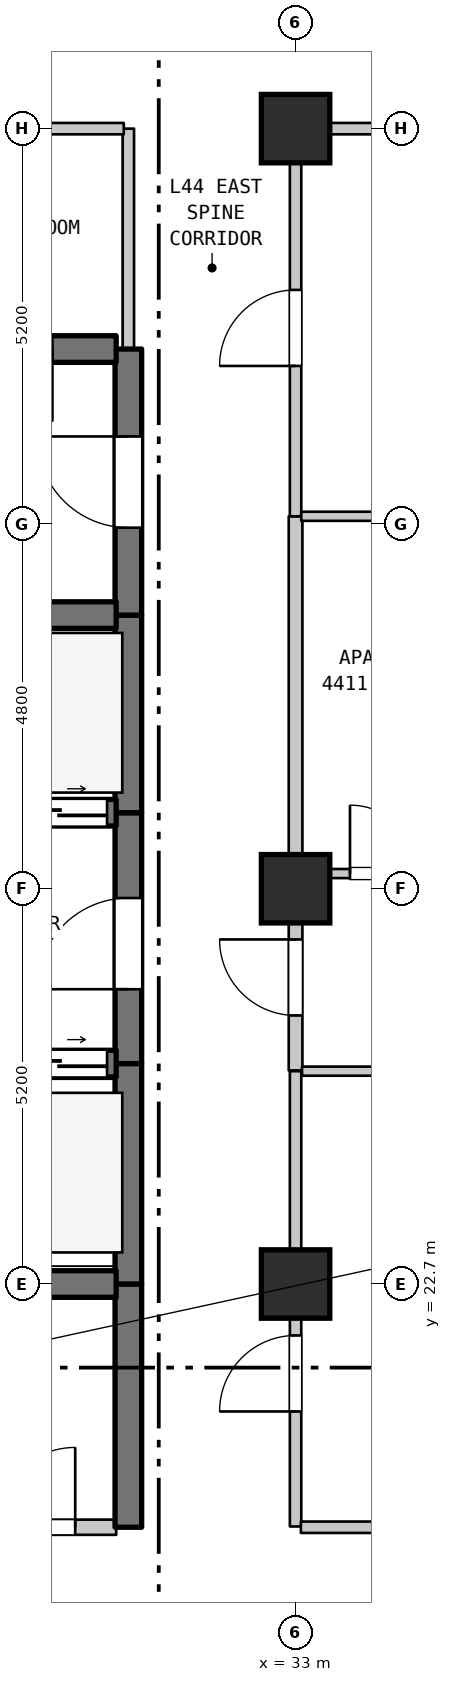
"""IFC4 building model, lengths in metres.
Left out: names, types, materials, properties, quantities, classifications, styles, units other than length and angle.
Written with IfcOpenShell. Run it as: python <this file> out.ifc"""

import sys

from ifc_helpers import new_model, si_unit, direction, frame, frame_2d, origin, origin_2d, place, context, subcontext, project, spatial, rectangle, extrude, element, fill, save


model = new_model("IFC4")
c1 = context("Model", 3, precision=1e-05, world=origin(), true_north=direction((0.0, 1.0)))
c2 = subcontext(c1, "Body", "Model", "MODEL_VIEW")
j1 = project(units=[si_unit("LENGTHUNIT", "METRE"), si_unit("PLANEANGLEUNIT", "RADIAN")], contexts=[c1])
p1 = place(None, origin())
s1 = spatial("IfcSite", under=j1, at=p1, CompositionType="ELEMENT")
p2 = place(p1, origin())
s2 = spatial("IfcBuilding", under=s1, at=p2, CompositionType="ELEMENT")
p3 = place(p2, frame((0.0, 0.0, 180.2)))
s3 = spatial("IfcBuildingStorey", under=s2, at=p3, CompositionType="ELEMENT", Elevation=180.2)
for number, where, z_axis, x_axis in (
    (1, (33.0, 22.7, 0.0), (0.0, 0.0, 1.0), (1.0, 0.0, 0.0)),
    (2, (33.0, 27.9, 0.0), (0.0, 0.0, 1.0), (1.0, 0.0, 0.0)),
    (3, (33.0, 37.9, 0.0), (0.0, 0.0, 1.0), (1.0, 0.0, 0.0)),
):
    element("IfcColumn", number, at=place(p3, frame(where, z_axis=z_axis, x_axis=x_axis)), inside=s3, PredefinedType="COLUMN", context=c2, shape_type="SweptSolid", body=[
        extrude(rectangle(XDim=0.9, YDim=0.9, at=origin_2d()), origin(), (0.0, 0.0, 1.0), 3.7),
    ])
p4 = place(p3, frame((30.8, 19.5, 0.0), z_axis=(0.0, 0.0, 1.0), x_axis=(0.0, 1.0, 0.0)))
e4 = element("IfcWall", 4, at=p4, inside=s3, PredefinedType="SHEAR", context=c2, shape_type="SweptSolid", body=[
    extrude(rectangle(XDim=3.2, YDim=0.35, at=frame_2d((1.6, 0.0))), origin(), (0.0, 0.0, 1.0), 3.38),
])
p5 = place(p3, frame((30.8, 22.7, 0.0), z_axis=(0.0, 0.0, 1.0), x_axis=(0.0, 1.0, 0.0)))
e5 = element("IfcWall", 5, at=p5, inside=s3, PredefinedType="SHEAR", context=c2, shape_type="SweptSolid", body=[
    extrude(rectangle(XDim=2.9, YDim=0.35, at=frame_2d((1.45, 0.0))), origin(), (0.0, 0.0, 1.0), 3.38),
])
p6 = place(p3, frame((30.8, 25.6, 0.0), z_axis=(0.0, 0.0, 1.0), x_axis=(0.0, 1.0, 0.0)))
e6 = element("IfcWall", 6, at=p6, inside=s3, PredefinedType="SHEAR", context=c2, shape_type="SweptSolid", body=[
    extrude(rectangle(XDim=3.3, YDim=0.35, at=frame_2d((1.65, 0.0))), origin(), (0.0, 0.0, 1.0), 3.38),
])
p7 = place(p6, frame((0.978, 0.0, 0.0)))
e7 = element("IfcOpeningElement", 7, at=p7, cuts=e6, PredefinedType="OPENING", context=c2, shape_type="SweptSolid", body=[
    extrude(rectangle(XDim=1.2, YDim=2.2, at=frame_2d((0.6, 1.1))), frame((0.0, 0.185, 0.0), z_axis=(0.0, -1.0, 0.0), x_axis=(1.0, 0.0, 0.0)), (0.0, 0.0, 1.0), 0.37),
])
p8 = place(p3, frame((30.8, 28.9, 0.0), z_axis=(0.0, 0.0, 1.0), x_axis=(0.0, 1.0, 0.0)))
e8 = element("IfcWall", 8, at=p8, inside=s3, PredefinedType="SHEAR", context=c2, shape_type="SweptSolid", body=[
    extrude(rectangle(XDim=2.6, YDim=0.35, at=frame_2d((1.3, 0.0))), origin(), (0.0, 0.0, 1.0), 3.38),
])
p9 = place(p3, frame((30.8, 31.5, 0.0), z_axis=(0.0, 0.0, 1.0), x_axis=(0.0, 1.0, 0.0)))
e9 = element("IfcWall", 9, at=p9, inside=s3, PredefinedType="SHEAR", context=c2, shape_type="SweptSolid", body=[
    extrude(rectangle(XDim=3.5, YDim=0.35, at=frame_2d((1.75, 0.0))), origin(), (0.0, 0.0, 1.0), 3.38),
])
p10 = place(p9, frame((1.15, 0.0, 0.0)))
e10 = element("IfcOpeningElement", 10, at=p10, cuts=e9, PredefinedType="OPENING", context=c2, shape_type="SweptSolid", body=[
    extrude(rectangle(XDim=1.2, YDim=2.2, at=frame_2d((0.6, 1.1))), frame((0.0, 0.185, 0.0), z_axis=(0.0, -1.0, 0.0), x_axis=(1.0, 0.0, 0.0)), (0.0, 0.0, 1.0), 0.37),
])
p11 = place(p3, frame((30.8, 35.0, 0.0), z_axis=(0.0, 0.0, 1.0), x_axis=(0.0, 1.0, 0.0)))
e11 = element("IfcWall", 11, at=p11, inside=s3, PredefinedType="STANDARD", context=c2, shape_type="SweptSolid", body=[
    extrude(rectangle(XDim=2.9, YDim=0.15, at=frame_2d((1.45, 0.0))), origin(), (0.0, 0.0, 1.0), 3.38),
])
p12 = place(p3, frame((33.0, 19.51, 0.0), z_axis=(0.0, 0.0, 1.0), x_axis=(0.0, 1.0, 0.0)))
e12 = element("IfcWall", 12, at=p12, inside=s3, PredefinedType="STANDARD", context=c2, shape_type="SweptSolid", body=[
    extrude(rectangle(XDim=5.99, YDim=0.15, at=frame_2d((2.995, 0.0))), origin(), (0.0, 0.0, 1.0), 2.98),
])
p13 = place(p12, frame((1.513, 0.0, 0.0)))
e13 = element("IfcOpeningElement", 13, at=p13, cuts=e12, PredefinedType="OPENING", context=c2, shape_type="SweptSolid", body=[
    extrude(rectangle(XDim=1.0, YDim=2.15, at=frame_2d((0.5, 1.075))), frame((0.0, 0.085, 0.0), z_axis=(0.0, -1.0, 0.0), x_axis=(1.0, 0.0, 0.0)), (0.0, 0.0, 1.0), 0.17),
])
p14 = place(p3, frame((33.0, 25.51, 0.0), z_axis=(0.0, 0.0, 1.0), x_axis=(0.0, 1.0, 0.0)))
e14 = element("IfcWall", 14, at=p14, inside=s3, PredefinedType="STANDARD", context=c2, shape_type="SweptSolid", body=[
    extrude(rectangle(XDim=2.6, YDim=0.18, at=frame_2d((1.3, 0.0))), origin(), (0.0, 0.0, 1.0), 2.98),
])
p15 = place(p14, frame((0.723, 0.0, 0.0)))
e15 = element("IfcOpeningElement", 15, at=p15, cuts=e14, PredefinedType="OPENING", context=c2, shape_type="SweptSolid", body=[
    extrude(rectangle(XDim=1.0, YDim=2.15, at=frame_2d((0.5, 1.075))), frame((0.0, 0.1, 0.0), z_axis=(0.0, -1.0, 0.0), x_axis=(1.0, 0.0, 0.0)), (0.0, 0.0, 1.0), 0.2),
])
p16 = place(p3, frame((33.0, 28.11, 0.0), z_axis=(0.0, 0.0, 1.0), x_axis=(0.0, 1.0, 0.0)))
e16 = element("IfcWall", 16, at=p16, inside=s3, PredefinedType="STANDARD", context=c2, shape_type="SweptSolid", body=[
    extrude(rectangle(XDim=4.69, YDim=0.18, at=frame_2d((2.345, 0.0))), origin(), (0.0, 0.0, 1.0), 2.88),
])
p17 = place(p3, frame((33.0, 32.8, 0.0), z_axis=(0.0, 0.0, 1.0), x_axis=(0.0, 1.0, 0.0)))
e17 = element("IfcWall", 17, at=p17, inside=s3, PredefinedType="STANDARD", context=c2, shape_type="SweptSolid", body=[
    extrude(rectangle(XDim=5.1, YDim=0.15, at=frame_2d((2.55, 0.0))), origin(), (0.0, 0.0, 1.0), 2.88),
])
p18 = place(p17, frame((1.978, 0.0, 0.0)))
e18 = element("IfcOpeningElement", 18, at=p18, cuts=e17, PredefinedType="OPENING", context=c2, shape_type="SweptSolid", body=[
    extrude(rectangle(XDim=1.0, YDim=2.15, at=frame_2d((0.5, 1.075))), frame((0.0, 0.085, 0.0), z_axis=(0.0, -1.0, 0.0), x_axis=(1.0, 0.0, 0.0)), (0.0, 0.0, 1.0), 0.17),
])
p19 = place(p3, frame((28.585, 19.5, 0.0), z_axis=(0.0, 0.0, 1.0), x_axis=(1.0, 0.0, 0.0)))
e19 = element("IfcWall", 19, at=p19, inside=s3, PredefinedType="STANDARD", context=c2, shape_type="SweptSolid", body=[
    extrude(rectangle(XDim=2.055, YDim=0.2, at=frame_2d((1.027, 0.0))), origin(), (0.0, 0.0, 1.0), 3.38),
])
p20 = place(p19, frame((0.466, 0.0, 0.0)))
e20 = element("IfcOpeningElement", 20, at=p20, cuts=e19, PredefinedType="OPENING", context=c2, shape_type="SweptSolid", body=[
    extrude(rectangle(XDim=1.05, YDim=2.15, at=frame_2d((0.525, 1.075))), frame((0.0, 0.11, 0.0), z_axis=(0.0, -1.0, 0.0), x_axis=(1.0, 0.0, 0.0)), (0.0, 0.0, 1.0), 0.22),
])
p21 = place(p3, frame((33.07, 19.5, 0.0), z_axis=(0.0, 0.0, 1.0), x_axis=(1.0, 0.0, 0.0)))
e21 = element("IfcWall", 21, at=p21, inside=s3, PredefinedType="STANDARD", context=c2, shape_type="SweptSolid", body=[
    extrude(rectangle(XDim=21.51, YDim=0.15, at=frame_2d((10.755, 0.0))), origin(), (0.0, 0.0, 1.0), 3.38),
])
p22 = place(p21, frame((10.185, 0.0, 0.0)))
e22 = element("IfcOpeningElement", 22, at=p22, cuts=e21, PredefinedType="OPENING", context=c2, shape_type="SweptSolid", body=[
    extrude(rectangle(XDim=1.0, YDim=2.15, at=frame_2d((0.5, 1.075))), frame((0.0, 0.085, 0.0), z_axis=(0.0, -1.0, 0.0), x_axis=(1.0, 0.0, 0.0)), (0.0, 0.0, 1.0), 0.17),
])
p23 = place(p3, frame((28.585, 22.7, 0.0), z_axis=(0.0, 0.0, 1.0), x_axis=(1.0, 0.0, 0.0)))
e23 = element("IfcWall", 23, at=p23, inside=s3, PredefinedType="SHEAR", context=c2, shape_type="SweptSolid", body=[
    extrude(rectangle(XDim=2.055, YDim=0.35, at=frame_2d((1.027, 0.0))), origin(), (0.0, 0.0, 1.0), 3.38),
])
p24 = place(p3, frame((33.085, 25.5, 0.0), z_axis=(0.0, 0.0, 1.0), x_axis=(1.0, 0.0, 0.0)))
e24 = element("IfcWall", 24, at=p24, inside=s3, PredefinedType="PARTITIONING", context=c2, shape_type="SweptSolid", body=[
    extrude(rectangle(XDim=23.905, YDim=0.12, at=frame_2d((11.953, 0.0))), origin(), (0.0, 0.0, 1.0), 3.38),
])
p25 = place(p3, frame((27.46, 25.6, 0.0), z_axis=(0.0, 0.0, 1.0), x_axis=(1.0, 0.0, 0.0)))
e25 = element("IfcWall", 25, at=p25, inside=s3, PredefinedType="SHEAR", context=c2, shape_type="SweptSolid", body=[
    extrude(rectangle(XDim=3.18, YDim=0.35, at=frame_2d((1.59, 0.0))), origin(), (0.0, 0.0, 1.0), 3.38),
])
p26 = place(p25, frame((0.12, 0.0, 0.0)))
e26 = element("IfcOpeningElement", 26, at=p26, cuts=e25, PredefinedType="OPENING", context=c2, shape_type="SweptSolid", body=[
    extrude(rectangle(XDim=1.25, YDim=2.2, at=frame_2d((0.625, 1.1))), frame((0.0, 0.185, 0.0), z_axis=(0.0, -1.0, 0.0), x_axis=(1.0, 0.0, 0.0)), (0.0, 0.0, 1.0), 0.37),
])
p27 = place(p25, frame((1.81, 0.0, 0.0)))
e27 = element("IfcOpeningElement", 27, at=p27, cuts=e25, PredefinedType="OPENING", context=c2, shape_type="SweptSolid", body=[
    extrude(rectangle(XDim=1.25, YDim=2.2, at=frame_2d((0.625, 1.1))), frame((0.0, 0.185, 0.0), z_axis=(0.0, -1.0, 0.0), x_axis=(1.0, 0.0, 0.0)), (0.0, 0.0, 1.0), 0.37),
])
p28 = place(p3, frame((33.075, 28.1, 0.0), z_axis=(0.0, 0.0, 1.0), x_axis=(1.0, 0.0, 0.0)))
e28 = element("IfcWall", 28, at=p28, inside=s3, PredefinedType="PARTITIONING", context=c2, shape_type="SweptSolid", body=[
    extrude(rectangle(XDim=2.364, YDim=0.12, at=frame_2d((1.182, 0.0))), origin(), (0.0, 0.0, 1.0), 3.38),
])
p29 = place(p28, frame((0.641, 0.0, 0.0)))
e29 = element("IfcOpeningElement", 29, at=p29, cuts=e28, PredefinedType="OPENING", context=c2, shape_type="SweptSolid", body=[
    extrude(rectangle(XDim=0.9, YDim=2.15, at=frame_2d((0.45, 1.075))), frame((0.0, 0.07, 0.0), z_axis=(0.0, -1.0, 0.0), x_axis=(1.0, 0.0, 0.0)), (0.0, 0.0, 1.0), 0.14),
])
p30 = place(p3, frame((27.46, 28.9, 0.0), z_axis=(0.0, 0.0, 1.0), x_axis=(1.0, 0.0, 0.0)))
e30 = element("IfcWall", 30, at=p30, inside=s3, PredefinedType="SHEAR", context=c2, shape_type="SweptSolid", body=[
    extrude(rectangle(XDim=3.18, YDim=0.35, at=frame_2d((1.59, 0.0))), origin(), (0.0, 0.0, 1.0), 3.38),
])
p31 = place(p30, frame((0.12, 0.0, 0.0)))
e31 = element("IfcOpeningElement", 31, at=p31, cuts=e30, PredefinedType="OPENING", context=c2, shape_type="SweptSolid", body=[
    extrude(rectangle(XDim=1.25, YDim=2.2, at=frame_2d((0.625, 1.1))), frame((0.0, 0.185, 0.0), z_axis=(0.0, -1.0, 0.0), x_axis=(1.0, 0.0, 0.0)), (0.0, 0.0, 1.0), 0.37),
])
p32 = place(p30, frame((1.81, 0.0, 0.0)))
e32 = element("IfcOpeningElement", 32, at=p32, cuts=e30, PredefinedType="OPENING", context=c2, shape_type="SweptSolid", body=[
    extrude(rectangle(XDim=1.25, YDim=2.2, at=frame_2d((0.625, 1.1))), frame((0.0, 0.185, 0.0), z_axis=(0.0, -1.0, 0.0), x_axis=(1.0, 0.0, 0.0)), (0.0, 0.0, 1.0), 0.37),
])
p33 = place(p3, frame((27.46, 31.5, 0.0), z_axis=(0.0, 0.0, 1.0), x_axis=(1.0, 0.0, 0.0)))
e33 = element("IfcWall", 33, at=p33, inside=s3, PredefinedType="SHEAR", context=c2, shape_type="SweptSolid", body=[
    extrude(rectangle(XDim=3.18, YDim=0.35, at=frame_2d((1.59, 0.0))), origin(), (0.0, 0.0, 1.0), 3.38),
])
p34 = place(p3, frame((33.075, 32.8, 0.0), z_axis=(0.0, 0.0, 1.0), x_axis=(1.0, 0.0, 0.0)))
e34 = element("IfcWall", 34, at=p34, inside=s3, PredefinedType="PARTITIONING", context=c2, shape_type="SweptSolid", body=[
    extrude(rectangle(XDim=2.364, YDim=0.12, at=frame_2d((1.182, 0.0))), origin(), (0.0, 0.0, 1.0), 3.38),
])
p35 = place(p3, frame((28.045, 35.0, 0.0), z_axis=(0.0, 0.0, 1.0), x_axis=(1.0, 0.0, 0.0)))
e35 = element("IfcWall", 35, at=p35, inside=s3, PredefinedType="SHEAR", context=c2, shape_type="SweptSolid", body=[
    extrude(rectangle(XDim=2.595, YDim=0.35, at=frame_2d((1.297, 0.0))), origin(), (0.0, 0.0, 1.0), 3.38),
])
p36 = place(p35, frame((0.806, 0.0, 0.0)))
e36 = element("IfcOpeningElement", 36, at=p36, cuts=e35, PredefinedType="OPENING", context=c2, shape_type="SweptSolid", body=[
    extrude(rectangle(XDim=0.95, YDim=2.15, at=frame_2d((0.475, 1.075))), frame((0.0, 0.185, 0.0), z_axis=(0.0, -1.0, 0.0), x_axis=(1.0, 0.0, 0.0)), (0.0, 0.0, 1.0), 0.37),
])
p37 = place(p3, frame((28.045, 37.9, 0.0), z_axis=(0.0, 0.0, 1.0), x_axis=(1.0, 0.0, 0.0)))
e37 = element("IfcWall", 37, at=p37, inside=s3, PredefinedType="STANDARD", context=c2, shape_type="SweptSolid", body=[
    extrude(rectangle(XDim=2.695, YDim=0.15, at=frame_2d((1.348, 0.0))), origin(), (0.0, 0.0, 1.0), 2.88),
])
p38 = place(p3, frame((33.06, 37.9, 0.0), z_axis=(0.0, 0.0, 1.0), x_axis=(1.0, 0.0, 0.0)))
e38 = element("IfcWall", 38, at=p38, inside=s3, PredefinedType="STANDARD", context=c2, shape_type="SweptSolid", body=[
    extrude(rectangle(XDim=7.164, YDim=0.15, at=frame_2d((3.582, 0.0))), origin(), (0.0, 0.0, 1.0), 3.38),
])
p39 = place(p38, frame((3.004, 0.0, 0.0)))
e39 = element("IfcOpeningElement", 39, at=p39, cuts=e38, PredefinedType="OPENING", context=c2, shape_type="SweptSolid", body=[
    extrude(rectangle(XDim=1.0, YDim=2.15, at=frame_2d((0.5, 1.075))), frame((0.0, 0.085, 0.0), z_axis=(0.0, -1.0, 0.0), x_axis=(1.0, 0.0, 0.0)), (0.0, 0.0, 1.0), 0.17),
])
p40 = place(p7, origin())
e40 = element("IfcDoor", 40, at=p40, inside=s3, OperationType="SINGLE_SWING_LEFT", PredefinedType="DOOR", context=c2, shape_type="SweptSolid", body=[
    extrude(rectangle(XDim=1.2, YDim=2.2, at=frame_2d((0.6, 1.1))), frame((0.0, 0.025, 0.0), z_axis=(0.0, -1.0, 0.0), x_axis=(1.0, 0.0, 0.0)), (0.0, 0.0, 1.0), 0.05),
])
fill(e7, e40)
p41 = place(p10, origin())
e41 = element("IfcDoor", 41, at=p41, inside=s3, OperationType="SINGLE_SWING_RIGHT", PredefinedType="DOOR", context=c2, shape_type="SweptSolid", body=[
    extrude(rectangle(XDim=1.2, YDim=2.2, at=frame_2d((0.6, 1.1))), frame((0.0, 0.025, 0.0), z_axis=(0.0, -1.0, 0.0), x_axis=(1.0, 0.0, 0.0)), (0.0, 0.0, 1.0), 0.05),
])
fill(e10, e41)
p42 = place(p13, origin())
e42 = element("IfcDoor", 42, at=p42, inside=s3, OperationType="SINGLE_SWING_LEFT", PredefinedType="DOOR", context=c2, shape_type="SweptSolid", body=[
    extrude(rectangle(XDim=1.0, YDim=2.15, at=frame_2d((0.5, 1.075))), frame((0.0, 0.025, 0.0), z_axis=(0.0, -1.0, 0.0), x_axis=(1.0, 0.0, 0.0)), (0.0, 0.0, 1.0), 0.05),
])
fill(e13, e42)
p43 = place(p15, origin())
e43 = element("IfcDoor", 43, at=p43, inside=s3, OperationType="SINGLE_SWING_RIGHT", PredefinedType="DOOR", context=c2, shape_type="SweptSolid", body=[
    extrude(rectangle(XDim=1.0, YDim=2.15, at=frame_2d((0.5, 1.075))), frame((0.0, 0.025, 0.0), z_axis=(0.0, -1.0, 0.0), x_axis=(1.0, 0.0, 0.0)), (0.0, 0.0, 1.0), 0.05),
])
fill(e15, e43)
p44 = place(p18, origin())
e44 = element("IfcDoor", 44, at=p44, inside=s3, OperationType="SINGLE_SWING_LEFT", PredefinedType="DOOR", context=c2, shape_type="SweptSolid", body=[
    extrude(rectangle(XDim=1.0, YDim=2.15, at=frame_2d((0.5, 1.075))), frame((0.0, 0.025, 0.0), z_axis=(0.0, -1.0, 0.0), x_axis=(1.0, 0.0, 0.0)), (0.0, 0.0, 1.0), 0.05),
])
fill(e18, e44)
p45 = place(p20, origin())
e45 = element("IfcDoor", 45, at=p45, inside=s3, OperationType="SINGLE_SWING_RIGHT", PredefinedType="DOOR", context=c2, shape_type="SweptSolid", body=[
    extrude(rectangle(XDim=1.05, YDim=2.15, at=frame_2d((0.525, 1.075))), frame((0.0, 0.025, 0.0), z_axis=(0.0, -1.0, 0.0), x_axis=(1.0, 0.0, 0.0)), (0.0, 0.0, 1.0), 0.05),
])
fill(e20, e45)
p46 = place(p27, origin())
e46 = element("IfcDoor", 46, at=p46, inside=s3, OperationType="DOUBLE_DOOR_SLIDING", PredefinedType="DOOR", context=c2, shape_type="SweptSolid", body=[
    extrude(rectangle(XDim=1.25, YDim=2.2, at=frame_2d((0.625, 1.1))), frame((0.0, 0.025, 0.0), z_axis=(0.0, -1.0, 0.0), x_axis=(1.0, 0.0, 0.0)), (0.0, 0.0, 1.0), 0.05),
])
fill(e27, e46)
p47 = place(p29, origin())
e47 = element("IfcDoor", 47, at=p47, inside=s3, OperationType="SINGLE_SWING_LEFT", PredefinedType="DOOR", context=c2, shape_type="SweptSolid", body=[
    extrude(rectangle(XDim=0.9, YDim=2.15, at=frame_2d((0.45, 1.075))), frame((0.0, 0.025, 0.0), z_axis=(0.0, -1.0, 0.0), x_axis=(1.0, 0.0, 0.0)), (0.0, 0.0, 1.0), 0.05),
])
fill(e29, e47)
p48 = place(p32, origin())
e48 = element("IfcDoor", 48, at=p48, inside=s3, OperationType="DOUBLE_DOOR_SLIDING", PredefinedType="DOOR", context=c2, shape_type="SweptSolid", body=[
    extrude(rectangle(XDim=1.25, YDim=2.2, at=frame_2d((0.625, 1.1))), frame((0.0, 0.025, 0.0), z_axis=(0.0, -1.0, 0.0), x_axis=(1.0, 0.0, 0.0)), (0.0, 0.0, 1.0), 0.05),
])
fill(e32, e48)
p49 = place(p36, frame((0.95, 0.0, 0.0), z_axis=(0.0, 0.0, 1.0), x_axis=(-1.0, 0.0, 0.0)))
e49 = element("IfcDoor", 49, at=p49, inside=s3, OperationType="SINGLE_SWING_RIGHT", PredefinedType="DOOR", context=c2, shape_type="SweptSolid", body=[
    extrude(rectangle(XDim=0.95, YDim=2.15, at=frame_2d((0.475, 1.075))), frame((0.0, 0.025, 0.0), z_axis=(0.0, -1.0, 0.0), x_axis=(1.0, 0.0, 0.0)), (0.0, 0.0, 1.0), 0.05),
])
fill(e36, e49)
save(model, sys.argv[1])
